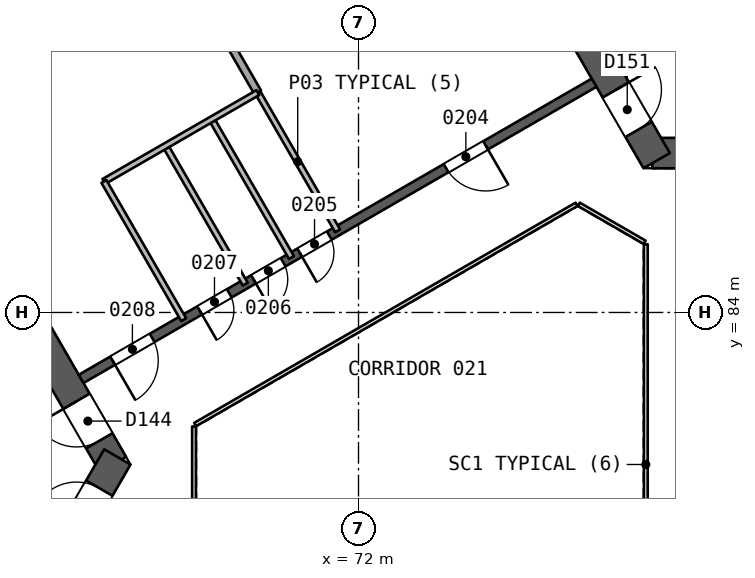
"""IFC4 building model, lengths in metres.
Left out: names, types, materials, properties, quantities, classifications, styles, units other than length and angle.
Written with IfcOpenShell. Run it as: python <this file> out.ifc"""

import sys

from ifc_helpers import new_model, si_unit, direction, frame, frame_2d, origin, place, context, subcontext, project, spatial, rectangle, extrude, element, fill, save


model = new_model("IFC4")
c1 = context("Model", 3, precision=1e-05, world=origin(), true_north=direction((0.0, 1.0)))
c2 = subcontext(c1, "Body", "Model", "MODEL_VIEW")
j1 = project(units=[si_unit("LENGTHUNIT", "METRE"), si_unit("PLANEANGLEUNIT", "RADIAN")], contexts=[c1])
p1 = place(None, origin())
s1 = spatial("IfcSite", under=j1, at=p1, CompositionType="ELEMENT")
p2 = place(p1, origin())
s2 = spatial("IfcBuilding", under=s1, at=p2, CompositionType="ELEMENT")
p3 = place(p2, frame((0.0, 0.0, 15.0)))
s3 = spatial("IfcBuildingStorey", under=s2, at=p3, CompositionType="ELEMENT", Elevation=15.0)
p4 = place(p3, frame((65.538, 80.0, 0.0), z_axis=(0.0, 0.0, 1.0), x_axis=(-0.49999662545, 0.866027352073, 0.0)))
e1 = element("IfcWall", 1, at=p4, inside=s3, PredefinedType="SHEAR", context=c2, shape_type="SweptSolid", body=[
    extrude(rectangle(XDim=10.149, YDim=0.8, at=frame_2d((5.074, 0.0))), origin(), (0.0, 0.0, 1.0), 5.4),
])
p5 = place(p4, frame((0.719, 0.0, 0.0)))
e2 = element("IfcOpeningElement", 2, at=p5, cuts=e1, PredefinedType="OPENING", context=c2, shape_type="SweptSolid", body=[
    extrude(rectangle(XDim=1.2, YDim=2.1, at=frame_2d((0.6, 1.05))), frame((0.0, 0.411, 0.0), z_axis=(0.0, -1.0, 0.0), x_axis=(1.0, 0.0, 0.0)), (0.0, 0.0, 1.0), 0.821),
])
p6 = place(p3, frame((60.664, 71.557, 0.0), z_axis=(0.0, 0.0, 1.0), x_axis=(0.50000409368, 0.866023040284, 0.0)))
e3 = element("IfcWall", 3, at=p6, inside=s3, PredefinedType="SHEAR", context=c2, shape_type="SweptSolid", body=[
    extrude(rectangle(XDim=9.98, YDim=0.8, at=frame_2d((4.99, 0.0))), origin(), (0.0, 0.0, 1.0), 5.4),
])
p7 = place(p6, frame((7.83, 0.0, 0.0)))
e4 = element("IfcOpeningElement", 4, at=p7, cuts=e3, PredefinedType="OPENING", context=c2, shape_type="SweptSolid", body=[
    extrude(rectangle(XDim=1.2, YDim=2.1, at=frame_2d((0.6, 1.05))), frame((0.0, 0.411, 0.0), z_axis=(0.0, -1.0, 0.0), x_axis=(1.0, 0.0, 0.0)), (0.0, 0.0, 1.0), 0.821),
])
p8 = place(p3, frame((79.731, 88.194, 0.0), z_axis=(0.0, 0.0, 1.0), x_axis=(1.0, 0.0, 0.0)))
e5 = element("IfcWall", 5, at=p8, inside=s3, PredefinedType="SHEAR", context=c2, shape_type="SweptSolid", body=[
    extrude(rectangle(XDim=10.149, YDim=0.8, at=frame_2d((5.074, 0.0))), origin(), (0.0, 0.0, 1.0), 5.4),
])
p9 = place(p8, frame((0.719, 0.0, 0.0)))
e6 = element("IfcOpeningElement", 6, at=p9, cuts=e5, PredefinedType="OPENING", context=c2, shape_type="SweptSolid", body=[
    extrude(rectangle(XDim=1.2, YDim=2.1, at=frame_2d((0.6, 1.05))), frame((0.0, 0.411, 0.0), z_axis=(0.0, -1.0, 0.0), x_axis=(1.0, 0.0, 0.0)), (0.0, 0.0, 1.0), 0.821),
])
p10 = place(p3, frame((74.856, 96.637, 0.0), z_axis=(0.0, 0.0, 1.0), x_axis=(0.499993500917, -0.866029155999, 0.0)))
e7 = element("IfcWall", 7, at=p10, inside=s3, PredefinedType="SHEAR", context=c2, shape_type="SweptSolid", body=[
    extrude(rectangle(XDim=9.98, YDim=0.8, at=frame_2d((4.99, 0.0))), origin(), (0.0, 0.0, 1.0), 5.4),
])
p11 = place(p10, frame((7.83, 0.0, 0.0)))
e8 = element("IfcOpeningElement", 8, at=p11, cuts=e7, PredefinedType="OPENING", context=c2, shape_type="SweptSolid", body=[
    extrude(rectangle(XDim=1.2, YDim=2.1, at=frame_2d((0.6, 1.05))), frame((0.0, 0.411, 0.0), z_axis=(0.0, -1.0, 0.0), x_axis=(1.0, 0.0, 0.0)), (0.0, 0.0, 1.0), 0.821),
])
p12 = place(p3, frame((78.2, 90.046, 0.0), z_axis=(0.0, 0.0, 1.0), x_axis=(-0.866026492143, -0.499998114903, 0.0)))
e9 = element("IfcWall", 9, at=p12, inside=s3, PredefinedType="SHEAR", context=c2, shape_type="SweptSolid", body=[
    extrude(rectangle(XDim=15.588, YDim=0.25, at=frame_2d((7.794, 0.0))), origin(), (0.0, 0.0, 1.0), 5.0),
])
p13 = place(p12, frame((3.297, 0.0, 0.0)))
e10 = element("IfcOpeningElement", 10, at=p13, cuts=e9, PredefinedType="OPENING", context=c2, shape_type="SweptSolid", body=[
    extrude(rectangle(XDim=1.2, YDim=2.4, at=frame_2d((0.6, 1.2))), frame((0.0, 0.135, 0.0), z_axis=(0.0, -1.0, 0.0), x_axis=(1.0, 0.0, 0.0)), (0.0, 0.0, 1.0), 0.271),
])
p14 = place(p12, frame((8.046, 0.0, 0.0)))
e11 = element("IfcOpeningElement", 11, at=p14, cuts=e9, PredefinedType="OPENING", context=c2, shape_type="SweptSolid", body=[
    extrude(rectangle(XDim=0.9, YDim=2.1, at=frame_2d((0.45, 1.05))), frame((0.0, 0.135, 0.0), z_axis=(0.0, -1.0, 0.0), x_axis=(1.0, 0.0, 0.0)), (0.0, 0.0, 1.0), 0.271),
])
p15 = place(p12, frame((9.449, 0.0, 0.0)))
e12 = element("IfcOpeningElement", 12, at=p15, cuts=e9, PredefinedType="OPENING", context=c2, shape_type="SweptSolid", body=[
    extrude(rectangle(XDim=0.9, YDim=2.1, at=frame_2d((0.45, 1.05))), frame((0.0, 0.135, 0.0), z_axis=(0.0, -1.0, 0.0), x_axis=(1.0, 0.0, 0.0)), (0.0, 0.0, 1.0), 0.271),
])
p16 = place(p12, frame((11.085, 0.0, 0.0)))
e13 = element("IfcOpeningElement", 13, at=p16, cuts=e9, PredefinedType="OPENING", context=c2, shape_type="SweptSolid", body=[
    extrude(rectangle(XDim=0.9, YDim=2.1, at=frame_2d((0.45, 1.05))), frame((0.0, 0.135, 0.0), z_axis=(0.0, -1.0, 0.0), x_axis=(1.0, 0.0, 0.0)), (0.0, 0.0, 1.0), 0.271),
])
p17 = place(p12, frame((13.43, 0.0, 0.0)))
e14 = element("IfcOpeningElement", 14, at=p17, cuts=e9, PredefinedType="OPENING", context=c2, shape_type="SweptSolid", body=[
    extrude(rectangle(XDim=1.2, YDim=2.4, at=frame_2d((0.6, 1.2))), frame((0.0, 0.135, 0.0), z_axis=(0.0, -1.0, 0.0), x_axis=(1.0, 0.0, 0.0)), (0.0, 0.0, 1.0), 0.271),
])
p18 = place(p3, frame((69.35, 89.786, 0.0), z_axis=(0.0, 0.0, 1.0), x_axis=(0.499958946799, -0.866049104564, 0.0)))
e15 = element("IfcWall", 15, at=p18, inside=s3, PredefinedType="PARTITIONING", context=c2, shape_type="SweptSolid", body=[
    extrude(rectangle(XDim=4.2, YDim=0.15, at=frame_2d((2.1, 0.0))), origin(), (0.0, 0.0, 1.0), 5.0),
])
p19 = place(p3, frame((60.85, 104.51, 0.0), z_axis=(0.0, 0.0, 1.0), x_axis=(0.500003389066, -0.866023447097, 0.0)))
e16 = element("IfcWall", 16, at=p19, inside=s3, PredefinedType="PARTITIONING", context=c2, shape_type="SweptSolid", body=[
    extrude(rectangle(XDim=17.001, YDim=0.2, at=frame_2d((8.5, 0.0))), origin(), (0.0, 0.0, 1.0), 5.0),
])
p20 = place(p3, frame((68.135, 89.085, 0.0), z_axis=(0.0, 0.0, 1.0), x_axis=(0.500002543286, -0.866023935413, 0.0)))
e17 = element("IfcWall", 17, at=p20, inside=s3, PredefinedType="PARTITIONING", context=c2, shape_type="SweptSolid", body=[
    extrude(rectangle(XDim=4.2, YDim=0.15, at=frame_2d((2.1, 0.0))), origin(), (0.0, 0.0, 1.0), 5.0),
])
p21 = place(p3, frame((66.92, 88.383, 0.0), z_axis=(0.0, 0.0, 1.0), x_axis=(0.500027713859, -0.866009402589, 0.0)))
e18 = element("IfcWall", 18, at=p21, inside=s3, PredefinedType="PARTITIONING", context=c2, shape_type="SweptSolid", body=[
    extrude(rectangle(XDim=4.2, YDim=0.15, at=frame_2d((2.1, 0.0))), origin(), (0.0, 0.0, 1.0), 5.0),
])
p22 = place(p3, frame((69.351, 89.785, 0.0), z_axis=(0.0, 0.0, 1.0), x_axis=(-0.866040404911, -0.499974016386, 0.0)))
e19 = element("IfcWall", 19, at=p22, inside=s3, PredefinedType="PARTITIONING", context=c2, shape_type="SweptSolid", body=[
    extrude(rectangle(XDim=4.677, YDim=0.15, at=frame_2d((2.338, 0.0))), origin(), (0.0, 0.0, 1.0), 5.0),
])
p23 = place(p3, frame((65.301, 87.447, 0.0), z_axis=(0.0, 0.0, 1.0), x_axis=(0.499972428603, -0.866041321553, 0.0)))
e20 = element("IfcWall", 20, at=p23, inside=s3, PredefinedType="PARTITIONING", context=c2, shape_type="SweptSolid", body=[
    extrude(rectangle(XDim=4.199, YDim=0.15, at=frame_2d((2.1, 0.0))), origin(), (0.0, 0.0, 1.0), 5.0),
])
p24 = place(p3, frame((26.66, 85.0, 0.0), z_axis=(0.0, 0.0, 1.0), x_axis=(0.866025599265, 0.499999661418, 0.0)))
e21 = element("IfcWall", 21, at=p24, inside=s3, PredefinedType="SOLIDWALL", context=c2, shape_type="SweptSolid", body=[
    extrude(rectangle(XDim=78.727, YDim=0.4, at=frame_2d((39.364, 0.0))), origin(), (0.0, 0.0, 1.0), 5.0),
])
p25 = place(p24, frame((42.061, 0.0, 0.9)))
e22 = element("IfcOpeningElement", 22, at=p25, cuts=e21, PredefinedType="OPENING", context=c2, shape_type="SweptSolid", body=[
    extrude(rectangle(XDim=2.4, YDim=2.4, at=frame_2d((1.2, 1.2))), frame((0.0, 0.21, 0.0), z_axis=(0.0, -1.0, 0.0), x_axis=(1.0, 0.0, 0.0)), (0.0, 0.0, 1.0), 0.421),
])
p26 = place(p24, frame((34.267, 0.0, 0.9)))
e23 = element("IfcOpeningElement", 23, at=p26, cuts=e21, PredefinedType="OPENING", context=c2, shape_type="SweptSolid", body=[
    extrude(rectangle(XDim=2.4, YDim=2.4, at=frame_2d((1.2, 1.2))), frame((0.0, 0.21, 0.0), z_axis=(0.0, -1.0, 0.0), x_axis=(1.0, 0.0, 0.0)), (0.0, 0.0, 1.0), 0.421),
])
p27 = place(p3, frame((86.77, 89.486, 0.0), z_axis=(0.0, 0.0, 1.0), x_axis=(-0.86601811187, 0.500012629753, 0.0)))
e24 = element("IfcWall", 24, at=p27, inside=s3, PredefinedType="SOLIDWALL", context=c2, shape_type="SweptSolid", body=[
    extrude(rectangle(XDim=10.9, YDim=0.2, at=frame_2d((5.45, 0.0))), origin(), (0.0, 0.0, 1.0), 5.0),
])
p28 = place(p3, frame((79.56, 74.206, 0.0), z_axis=(0.0, 0.0, 1.0), x_axis=(0.0, 1.0, 0.0)))
e25 = element("IfcWall", 25, at=p28, inside=s3, PredefinedType="PARTITIONING", context=c2, shape_type="SweptSolid", body=[
    extrude(rectangle(XDim=11.588, YDim=0.1, at=frame_2d((5.794, 0.0))), origin(), (0.0, 0.0, 1.0), 5.0),
])
p29 = place(p3, frame((79.53, 85.846, 0.0), z_axis=(0.0, 0.0, 1.0), x_axis=(-0.866041268327, 0.499972520799, 0.0)))
e26 = element("IfcWall", 26, at=p29, inside=s3, PredefinedType="PARTITIONING", context=c2, shape_type="SweptSolid", body=[
    extrude(rectangle(XDim=2.0, YDim=0.1, at=frame_2d((1.0, 0.0))), origin(), (0.0, 0.0, 1.0), 5.0),
])
p30 = place(p3, frame((77.738, 86.846, 0.0), z_axis=(0.0, 0.0, 1.0), x_axis=(-0.866026658274, -0.499997827154, 0.0)))
e27 = element("IfcWall", 27, at=p30, inside=s3, PredefinedType="PARTITIONING", context=c2, shape_type="SweptSolid", body=[
    extrude(rectangle(XDim=11.588, YDim=0.1, at=frame_2d((5.794, 0.0))), origin(), (0.0, 0.0, 1.0), 5.0),
])
p31 = place(p3, frame((67.672, 81.0, 0.0), z_axis=(0.0, 0.0, 1.0), x_axis=(0.0, -1.0, 0.0)))
e28 = element("IfcWall", 28, at=p31, inside=s3, PredefinedType="PARTITIONING", context=c2, shape_type="SweptSolid", body=[
    extrude(rectangle(XDim=2.0, YDim=0.1, at=frame_2d((1.0, 0.0))), origin(), (0.0, 0.0, 1.0), 5.0),
])
p32 = place(p13, origin())
e29 = element("IfcDoor", 29, at=p32, inside=s3, OperationType="SINGLE_SWING_LEFT", PredefinedType="NOTDEFINED", context=c2, shape_type="SweptSolid", body=[
    extrude(rectangle(XDim=1.2, YDim=2.4, at=frame_2d((0.6, 1.2))), frame((0.0, 0.025, 0.0), z_axis=(0.0, -1.0, 0.0), x_axis=(1.0, 0.0, 0.0)), (0.0, 0.0, 1.0), 0.05),
])
fill(e10, e29)
p33 = place(p14, origin())
e30 = element("IfcDoor", 30, at=p33, inside=s3, OperationType="SINGLE_SWING_RIGHT", PredefinedType="NOTDEFINED", context=c2, shape_type="SweptSolid", body=[
    extrude(rectangle(XDim=0.9, YDim=2.1, at=frame_2d((0.45, 1.05))), frame((0.0, 0.025, 0.0), z_axis=(0.0, -1.0, 0.0), x_axis=(1.0, 0.0, 0.0)), (0.0, 0.0, 1.0), 0.05),
])
fill(e11, e30)
p34 = place(p15, origin())
e31 = element("IfcDoor", 31, at=p34, inside=s3, OperationType="SINGLE_SWING_RIGHT", PredefinedType="NOTDEFINED", context=c2, shape_type="SweptSolid", body=[
    extrude(rectangle(XDim=0.9, YDim=2.1, at=frame_2d((0.45, 1.05))), frame((0.0, 0.025, 0.0), z_axis=(0.0, -1.0, 0.0), x_axis=(1.0, 0.0, 0.0)), (0.0, 0.0, 1.0), 0.05),
])
fill(e12, e31)
p35 = place(p16, origin())
e32 = element("IfcDoor", 32, at=p35, inside=s3, OperationType="SINGLE_SWING_RIGHT", PredefinedType="NOTDEFINED", context=c2, shape_type="SweptSolid", body=[
    extrude(rectangle(XDim=0.9, YDim=2.1, at=frame_2d((0.45, 1.05))), frame((0.0, 0.025, 0.0), z_axis=(0.0, -1.0, 0.0), x_axis=(1.0, 0.0, 0.0)), (0.0, 0.0, 1.0), 0.05),
])
fill(e13, e32)
p36 = place(p17, origin())
e33 = element("IfcDoor", 33, at=p36, inside=s3, OperationType="SINGLE_SWING_RIGHT", PredefinedType="NOTDEFINED", context=c2, shape_type="SweptSolid", body=[
    extrude(rectangle(XDim=1.2, YDim=2.4, at=frame_2d((0.6, 1.2))), frame((0.0, 0.025, 0.0), z_axis=(0.0, -1.0, 0.0), x_axis=(1.0, 0.0, 0.0)), (0.0, 0.0, 1.0), 0.05),
])
fill(e14, e33)
p37 = place(p5, origin())
e34 = element("IfcDoor", 34, at=p37, inside=s3, OperationType="SINGLE_SWING_RIGHT", PredefinedType="NOTDEFINED", context=c2, shape_type="SweptSolid", body=[
    extrude(rectangle(XDim=1.2, YDim=2.1, at=frame_2d((0.6, 1.05))), frame((0.0, 0.025, 0.0), z_axis=(0.0, -1.0, 0.0), x_axis=(1.0, 0.0, 0.0)), (0.0, 0.0, 1.0), 0.05),
])
fill(e2, e34)
p38 = place(p7, origin())
e35 = element("IfcDoor", 35, at=p38, inside=s3, OperationType="SINGLE_SWING_LEFT", PredefinedType="NOTDEFINED", context=c2, shape_type="SweptSolid", body=[
    extrude(rectangle(XDim=1.2, YDim=2.1, at=frame_2d((0.6, 1.05))), frame((0.0, 0.025, 0.0), z_axis=(0.0, -1.0, 0.0), x_axis=(1.0, 0.0, 0.0)), (0.0, 0.0, 1.0), 0.05),
])
fill(e4, e35)
p39 = place(p11, origin())
e36 = element("IfcDoor", 36, at=p39, inside=s3, OperationType="SINGLE_SWING_LEFT", PredefinedType="NOTDEFINED", context=c2, shape_type="SweptSolid", body=[
    extrude(rectangle(XDim=1.2, YDim=2.1, at=frame_2d((0.6, 1.05))), frame((0.0, 0.025, 0.0), z_axis=(0.0, -1.0, 0.0), x_axis=(1.0, 0.0, 0.0)), (0.0, 0.0, 1.0), 0.05),
])
fill(e8, e36)
save(model, sys.argv[1])
